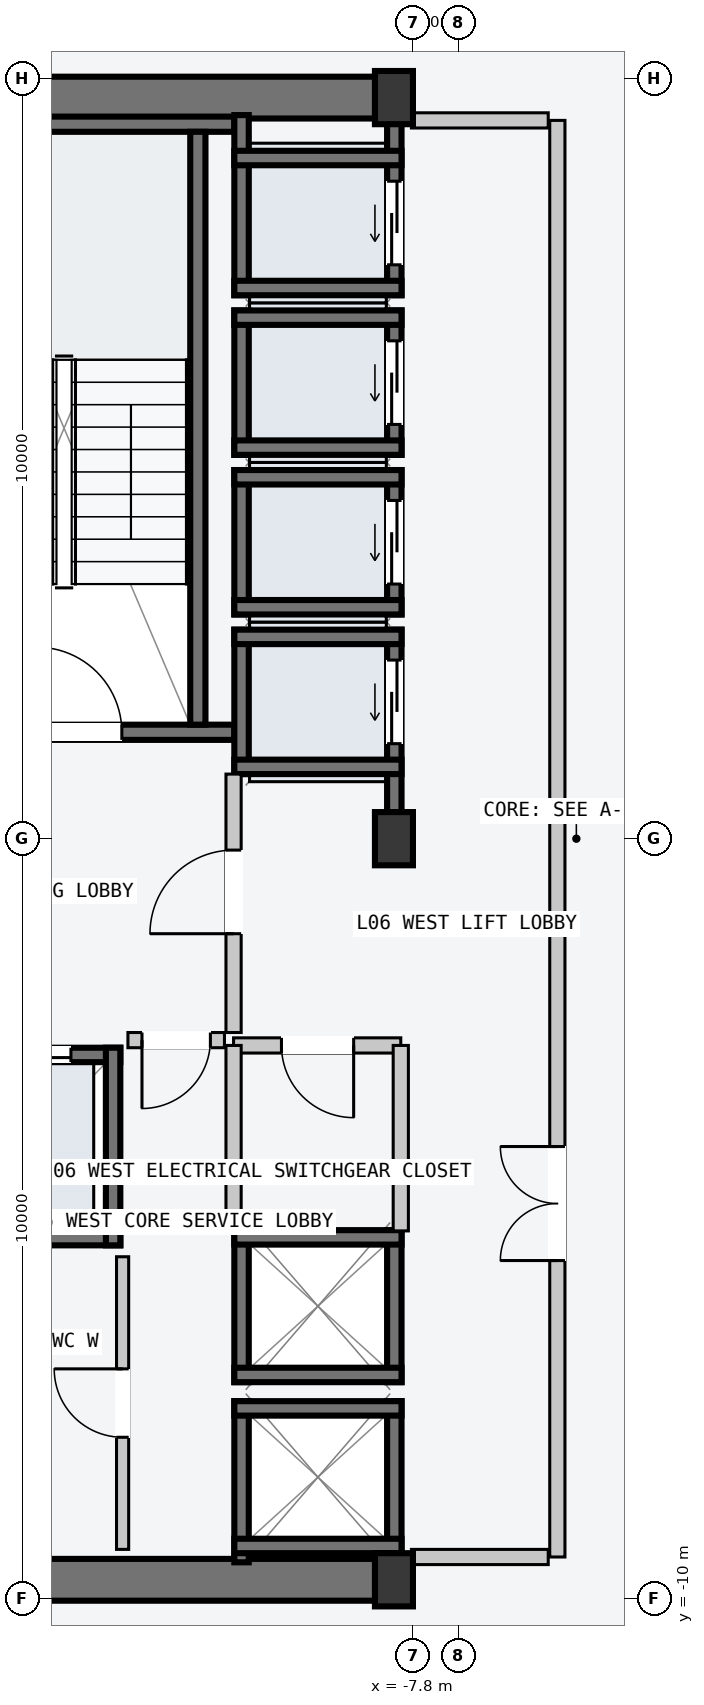
"""IFC4 building model, lengths in metres.
Left out: names, types, materials, properties, quantities, classifications, styles, units other than length and angle.
Written with IfcOpenShell. Run it as: python <this file> out.ifc"""

import sys

from ifc_helpers import new_model, si_unit, direction, frame, frame_2d, origin, origin_2d, place, context, subcontext, project, spatial, rectangle, i_section, extrude, element, fill, save


model = new_model("IFC4")
c1 = context("Model", 3, precision=1e-05, world=origin(), true_north=direction((0.0, 1.0)))
c2 = subcontext(c1, "Body", "Model", "MODEL_VIEW")
j1 = project(units=[si_unit("LENGTHUNIT", "METRE"), si_unit("PLANEANGLEUNIT", "RADIAN")], contexts=[c1])
p1 = place(None, origin())
s1 = spatial("IfcSite", under=j1, at=p1, CompositionType="ELEMENT")
p2 = place(p1, origin())
s2 = spatial("IfcBuilding", under=s1, at=p2, CompositionType="ELEMENT")
p3 = place(p2, frame((0.0, 0.0, 27.6)))
s3 = spatial("IfcBuildingStorey", under=s2, at=p3, CompositionType="ELEMENT", Elevation=27.6)
for number, where, z_axis, x_axis in (
    (1, (-14.53, -9.75, -0.2), (0.0, 0.0, 1.0), (1.0, 0.0, 0.0)),
    (2, (-14.53, 9.75, -0.2), (0.0, 0.0, 1.0), (1.0, 0.0, 0.0)),
):
    element("IfcWall", number, at=place(p3, frame(where, z_axis=z_axis, x_axis=x_axis)), inside=s3, PredefinedType="SHEAR", context=c2, shape_type="SweptSolid", body=[
        extrude(rectangle(XDim=6.46, YDim=0.55, at=frame_2d((3.23, 0.0))), origin(), (0.0, 0.0, 1.0), 3.6),
    ])
p4 = place(p3, frame((-14.25, 1.4, -0.2), z_axis=(0.0, 0.0, 1.0), x_axis=(1.0, 0.0, 0.0)))
e3 = element("IfcWall", 3, at=p4, inside=s3, PredefinedType="SOLIDWALL", context=c2, shape_type="SweptSolid", body=[
    extrude(rectangle(XDim=4.1, YDim=0.2, at=frame_2d((2.05, 0.0))), origin(), (0.0, 0.0, 1.0), 3.6),
])
p5 = place(p4, frame((1.5, 0.0, 0.2)))
e4 = element("IfcOpeningElement", 4, at=p5, cuts=e3, PredefinedType="OPENING", context=c2, shape_type="SweptSolid", body=[
    extrude(rectangle(XDim=1.12, YDim=2.18, at=frame_2d((0.56, 1.09))), frame((0.0, 0.11, 0.0), z_axis=(0.0, -1.0, 0.0), x_axis=(1.0, 0.0, 0.0)), (0.0, 0.0, 1.0), 0.22),
])
p6 = place(p3, frame((-14.25, 9.4, -0.2), z_axis=(0.0, 0.0, 1.0), x_axis=(1.0, 0.0, 0.0)))
e5 = element("IfcWall", 5, at=p6, inside=s3, PredefinedType="SOLIDWALL", context=c2, shape_type="SweptSolid", body=[
    extrude(rectangle(XDim=4.1, YDim=0.2, at=frame_2d((2.05, 0.0))), origin(), (0.0, 0.0, 1.0), 3.6),
])
p7 = place(p3, frame((-10.63, 1.5, -0.2), z_axis=(0.0, 0.0, 1.0), x_axis=(0.0, 1.0, 0.0)))
e6 = element("IfcWall", 6, at=p7, inside=s3, PredefinedType="SOLIDWALL", context=c2, shape_type="SweptSolid", body=[
    extrude(rectangle(XDim=7.8, YDim=0.2, at=frame_2d((3.9, 0.0))), origin(), (0.0, 0.0, 1.0), 3.6),
])
for number, where, z_axis, x_axis in (
    (7, (-8.05, -9.75, 0.0), (0.0, 0.0, 1.0), (1.0, 0.0, 0.0)),
    (8, (-8.05, 0.0, 0.0), (0.0, 0.0, 1.0), (1.0, 0.0, 0.0)),
    (9, (-8.05, 9.75, 0.0), (0.0, 0.0, 1.0), (1.0, 0.0, 0.0)),
):
    element("IfcColumn", number, at=place(p3, frame(where, z_axis=z_axis, x_axis=x_axis)), inside=s3, PredefinedType="COLUMN", context=c2, shape_type="SweptSolid", body=[
        extrude(i_section(OverallWidth=0.5, OverallDepth=0.7, WebThickness=0.028, FlangeThickness=0.045, at=origin_2d()), origin(), (0.0, 0.0, 1.0), 3.6),
    ])
p8 = place(p3, frame((-8.045, 0.21, -0.2), z_axis=(0.0, 0.0, 1.0), x_axis=(0.0, 1.0, 0.0)))
e10 = element("IfcWall", 10, at=p8, inside=s3, PredefinedType="SOLIDWALL", context=c2, shape_type="SweptSolid", body=[
    extrude(rectangle(XDim=2.54, YDim=0.19, at=frame_2d((1.27, 0.0))), origin(), (0.0, 0.0, 1.0), 3.6),
])
p9 = place(p8, frame((1.04, 0.0, 0.2)))
e11 = element("IfcOpeningElement", 11, at=p9, cuts=e10, PredefinedType="OPENING", context=c2, shape_type="SweptSolid", body=[
    extrude(rectangle(XDim=1.1, YDim=2.2, at=frame_2d((0.55, 1.1))), frame((0.0, 0.105, 0.0), z_axis=(0.0, -1.0, 0.0), x_axis=(1.0, 0.0, 0.0)), (0.0, 0.0, 1.0), 0.21),
])
p10 = place(p3, frame((-10.055, 0.85, -0.2), z_axis=(0.0, 0.0, 1.0), x_axis=(0.0, 1.0, 0.0)))
e12 = element("IfcWall", 12, at=p10, inside=s3, PredefinedType="SOLIDWALL", context=c2, shape_type="SweptSolid", body=[
    extrude(rectangle(XDim=1.9, YDim=0.19, at=frame_2d((0.95, 0.0))), origin(), (0.0, 0.0, 1.0), 3.6),
])
for number, where, z_axis, x_axis in (
    (13, (-10.15, 2.655, -0.2), (0.0, 0.0, 1.0), (1.0, 0.0, 0.0)),
    (14, (-10.15, 0.945, -0.2), (0.0, 0.0, 1.0), (1.0, 0.0, 0.0)),
):
    element("IfcWall", number, at=place(p3, frame(where, z_axis=z_axis, x_axis=x_axis)), inside=s3, PredefinedType="SOLIDWALL", context=c2, shape_type="SweptSolid", body=[
        extrude(rectangle(XDim=2.2, YDim=0.19, at=frame_2d((1.1, 0.0))), origin(), (0.0, 0.0, 1.0), 3.6),
    ])
p11 = place(p3, frame((-8.045, 2.95, -0.2), z_axis=(0.0, 0.0, 1.0), x_axis=(0.0, 1.0, 0.0)))
e15 = element("IfcWall", 15, at=p11, inside=s3, PredefinedType="SOLIDWALL", context=c2, shape_type="SweptSolid", body=[
    extrude(rectangle(XDim=1.9, YDim=0.19, at=frame_2d((0.95, 0.0))), origin(), (0.0, 0.0, 1.0), 3.6),
])
p12 = place(p11, frame((0.4, 0.0, 0.2)))
e16 = element("IfcOpeningElement", 16, at=p12, cuts=e15, PredefinedType="OPENING", context=c2, shape_type="SweptSolid", body=[
    extrude(rectangle(XDim=1.1, YDim=2.2, at=frame_2d((0.55, 1.1))), frame((0.0, 0.105, 0.0), z_axis=(0.0, -1.0, 0.0), x_axis=(1.0, 0.0, 0.0)), (0.0, 0.0, 1.0), 0.21),
])
p13 = place(p3, frame((-10.055, 2.95, -0.2), z_axis=(0.0, 0.0, 1.0), x_axis=(0.0, 1.0, 0.0)))
e17 = element("IfcWall", 17, at=p13, inside=s3, PredefinedType="SOLIDWALL", context=c2, shape_type="SweptSolid", body=[
    extrude(rectangle(XDim=1.9, YDim=0.19, at=frame_2d((0.95, 0.0))), origin(), (0.0, 0.0, 1.0), 3.6),
])
for number, where, z_axis, x_axis in (
    (18, (-10.15, 4.755, -0.2), (0.0, 0.0, 1.0), (1.0, 0.0, 0.0)),
    (19, (-10.15, 3.045, -0.2), (0.0, 0.0, 1.0), (1.0, 0.0, 0.0)),
):
    element("IfcWall", number, at=place(p3, frame(where, z_axis=z_axis, x_axis=x_axis)), inside=s3, PredefinedType="SOLIDWALL", context=c2, shape_type="SweptSolid", body=[
        extrude(rectangle(XDim=2.2, YDim=0.19, at=frame_2d((1.1, 0.0))), origin(), (0.0, 0.0, 1.0), 3.6),
    ])
p14 = place(p3, frame((-8.045, 5.05, -0.2), z_axis=(0.0, 0.0, 1.0), x_axis=(0.0, 1.0, 0.0)))
e20 = element("IfcWall", 20, at=p14, inside=s3, PredefinedType="SOLIDWALL", context=c2, shape_type="SweptSolid", body=[
    extrude(rectangle(XDim=1.9, YDim=0.19, at=frame_2d((0.95, 0.0))), origin(), (0.0, 0.0, 1.0), 3.6),
])
p15 = place(p14, frame((0.4, 0.0, 0.2)))
e21 = element("IfcOpeningElement", 21, at=p15, cuts=e20, PredefinedType="OPENING", context=c2, shape_type="SweptSolid", body=[
    extrude(rectangle(XDim=1.1, YDim=2.2, at=frame_2d((0.55, 1.1))), frame((0.0, 0.105, 0.0), z_axis=(0.0, -1.0, 0.0), x_axis=(1.0, 0.0, 0.0)), (0.0, 0.0, 1.0), 0.21),
])
p16 = place(p3, frame((-10.055, 5.05, -0.2), z_axis=(0.0, 0.0, 1.0), x_axis=(0.0, 1.0, 0.0)))
e22 = element("IfcWall", 22, at=p16, inside=s3, PredefinedType="SOLIDWALL", context=c2, shape_type="SweptSolid", body=[
    extrude(rectangle(XDim=1.9, YDim=0.19, at=frame_2d((0.95, 0.0))), origin(), (0.0, 0.0, 1.0), 3.6),
])
for number, where, z_axis, x_axis in (
    (23, (-10.15, 6.855, -0.2), (0.0, 0.0, 1.0), (1.0, 0.0, 0.0)),
    (24, (-10.15, 5.145, -0.2), (0.0, 0.0, 1.0), (1.0, 0.0, 0.0)),
):
    element("IfcWall", number, at=place(p3, frame(where, z_axis=z_axis, x_axis=x_axis)), inside=s3, PredefinedType="SOLIDWALL", context=c2, shape_type="SweptSolid", body=[
        extrude(rectangle(XDim=2.2, YDim=0.19, at=frame_2d((1.1, 0.0))), origin(), (0.0, 0.0, 1.0), 3.6),
    ])
p17 = place(p3, frame((-8.045, 7.15, -0.2), z_axis=(0.0, 0.0, 1.0), x_axis=(0.0, 1.0, 0.0)))
e25 = element("IfcWall", 25, at=p17, inside=s3, PredefinedType="SOLIDWALL", context=c2, shape_type="SweptSolid", body=[
    extrude(rectangle(XDim=2.37, YDim=0.19, at=frame_2d((1.185, 0.0))), origin(), (0.0, 0.0, 1.0), 3.6),
])
p18 = place(p17, frame((0.4, 0.0, 0.2)))
e26 = element("IfcOpeningElement", 26, at=p18, cuts=e25, PredefinedType="OPENING", context=c2, shape_type="SweptSolid", body=[
    extrude(rectangle(XDim=1.1, YDim=2.2, at=frame_2d((0.55, 1.1))), frame((0.0, 0.105, 0.0), z_axis=(0.0, -1.0, 0.0), x_axis=(1.0, 0.0, 0.0)), (0.0, 0.0, 1.0), 0.21),
])
p19 = place(p3, frame((-10.055, 7.15, -0.2), z_axis=(0.0, 0.0, 1.0), x_axis=(0.0, 1.0, 0.0)))
e27 = element("IfcWall", 27, at=p19, inside=s3, PredefinedType="SOLIDWALL", context=c2, shape_type="SweptSolid", body=[
    extrude(rectangle(XDim=2.37, YDim=0.19, at=frame_2d((1.185, 0.0))), origin(), (0.0, 0.0, 1.0), 3.6),
])
for number, where, z_axis, x_axis in (
    (28, (-10.15, 8.955, -0.2), (0.0, 0.0, 1.0), (1.0, 0.0, 0.0)),
    (29, (-10.15, 7.245, -0.2), (0.0, 0.0, 1.0), (1.0, 0.0, 0.0)),
):
    element("IfcWall", number, at=place(p3, frame(where, z_axis=z_axis, x_axis=x_axis)), inside=s3, PredefinedType="SOLIDWALL", context=c2, shape_type="SweptSolid", body=[
        extrude(rectangle(XDim=2.2, YDim=0.19, at=frame_2d((1.1, 0.0))), origin(), (0.0, 0.0, 1.0), 3.6),
    ])
for number, where, z_axis, x_axis in (
    (30, (-8.045, -9.52, -0.2), (0.0, 0.0, 1.0), (0.0, 1.0, 0.0)),
    (31, (-10.055, -9.52, -0.2), (0.0, 0.0, 1.0), (0.0, 1.0, 0.0)),
):
    element("IfcWall", number, at=place(p3, frame(where, z_axis=z_axis, x_axis=x_axis)), inside=s3, PredefinedType="SOLIDWALL", context=c2, shape_type="SweptSolid", body=[
        extrude(rectangle(XDim=2.12, YDim=0.19, at=frame_2d((1.06, 0.0))), origin(), (0.0, 0.0, 1.0), 3.6),
    ])
for number, where, z_axis, x_axis in (
    (32, (-10.15, -7.495, -0.2), (0.0, 0.0, 1.0), (1.0, 0.0, 0.0)),
    (33, (-10.15, -9.305, -0.2), (0.0, 0.0, 1.0), (1.0, 0.0, 0.0)),
):
    element("IfcWall", number, at=place(p3, frame(where, z_axis=z_axis, x_axis=x_axis)), inside=s3, PredefinedType="SOLIDWALL", context=c2, shape_type="SweptSolid", body=[
        extrude(rectangle(XDim=2.2, YDim=0.19, at=frame_2d((1.1, 0.0))), origin(), (0.0, 0.0, 1.0), 3.6),
    ])
for number, where, z_axis, x_axis in (
    (34, (-8.045, -7.15, -0.2), (0.0, 0.0, 1.0), (0.0, 1.0, 0.0)),
    (35, (-10.055, -7.15, -0.2), (0.0, 0.0, 1.0), (0.0, 1.0, 0.0)),
):
    element("IfcWall", number, at=place(p3, frame(where, z_axis=z_axis, x_axis=x_axis)), inside=s3, PredefinedType="SOLIDWALL", context=c2, shape_type="SweptSolid", body=[
        extrude(rectangle(XDim=2.0, YDim=0.19, at=frame_2d((1.0, 0.0))), origin(), (0.0, 0.0, 1.0), 3.6),
    ])
for number, where, z_axis, x_axis in (
    (36, (-10.15, -5.245, -0.2), (0.0, 0.0, 1.0), (1.0, 0.0, 0.0)),
    (37, (-10.15, -7.055, -0.2), (0.0, 0.0, 1.0), (1.0, 0.0, 0.0)),
):
    element("IfcWall", number, at=place(p3, frame(where, z_axis=z_axis, x_axis=x_axis)), inside=s3, PredefinedType="SOLIDWALL", context=c2, shape_type="SweptSolid", body=[
        extrude(rectangle(XDim=2.2, YDim=0.19, at=frame_2d((1.1, 0.0))), origin(), (0.0, 0.0, 1.0), 3.6),
    ])
p20 = place(p3, frame((-14.33, -2.845, -0.2), z_axis=(0.0, 0.0, 1.0), x_axis=(1.0, 0.0, 0.0)))
e38 = element("IfcWall", 38, at=p20, inside=s3, PredefinedType="SOLIDWALL", context=c2, shape_type="SweptSolid", body=[
    extrude(rectangle(XDim=2.68, YDim=0.19, at=frame_2d((1.34, 0.0))), origin(), (0.0, 0.0, 1.0), 3.6),
])
p21 = place(p20, frame((0.83, 0.0, 0.2)))
e39 = element("IfcOpeningElement", 39, at=p21, cuts=e38, PredefinedType="OPENING", context=c2, shape_type="SweptSolid", body=[
    extrude(rectangle(XDim=1.2, YDim=2.2, at=frame_2d((0.6, 1.1))), frame((0.0, 0.105, 0.0), z_axis=(0.0, -1.0, 0.0), x_axis=(1.0, 0.0, 0.0)), (0.0, 0.0, 1.0), 0.21),
])
p22 = place(p3, frame((-14.33, -5.255, -0.2), z_axis=(0.0, 0.0, 1.0), x_axis=(1.0, 0.0, 0.0)))
e40 = element("IfcWall", 40, at=p22, inside=s3, PredefinedType="SOLIDWALL", context=c2, shape_type="SweptSolid", body=[
    extrude(rectangle(XDim=2.68, YDim=0.19, at=frame_2d((1.34, 0.0))), origin(), (0.0, 0.0, 1.0), 3.6),
])
p23 = place(p3, frame((-11.745, -5.35, -0.2), z_axis=(0.0, 0.0, 1.0), x_axis=(0.0, 1.0, 0.0)))
e41 = element("IfcWall", 41, at=p23, inside=s3, PredefinedType="SOLIDWALL", context=c2, shape_type="SweptSolid", body=[
    extrude(rectangle(XDim=2.6, YDim=0.19, at=frame_2d((1.3, 0.0))), origin(), (0.0, 0.0, 1.0), 3.6),
])
p24 = place(p3, frame((-5.9, -9.45, 0.0), z_axis=(0.0, 0.0, 1.0), x_axis=(0.0, 1.0, 0.0)))
e42 = element("IfcWall", 42, at=p24, inside=s3, PredefinedType="PARTITIONING", context=c2, shape_type="SweptSolid", body=[
    extrude(rectangle(XDim=18.9, YDim=0.2, at=frame_2d((9.45, 0.0))), origin(), (0.0, 0.0, 1.0), 3.4),
])
p25 = place(p24, frame((3.9, 0.0, 0.0)))
e43 = element("IfcOpeningElement", 43, at=p25, cuts=e42, PredefinedType="OPENING", context=c2, shape_type="SweptSolid", body=[
    extrude(rectangle(XDim=1.5, YDim=2.2, at=frame_2d((0.75, 1.1))), frame((0.0, 0.11, 0.0), z_axis=(0.0, -1.0, 0.0), x_axis=(1.0, 0.0, 0.0)), (0.0, 0.0, 1.0), 0.22),
])
for number, where, z_axis, x_axis in (
    (44, (-6.02, -9.45, 0.0), (0.0, 0.0, 1.0), (-1.0, 0.0, 0.0)),
    (45, (-6.02, 9.45, 0.0), (0.0, 0.0, 1.0), (-1.0, 0.0, 0.0)),
):
    element("IfcWall", number, at=place(p3, frame(where, z_axis=z_axis, x_axis=x_axis)), inside=s3, PredefinedType="PARTITIONING", context=c2, shape_type="SweptSolid", body=[
        extrude(rectangle(XDim=1.8, YDim=0.2, at=frame_2d((0.9, 0.0))), origin(), (0.0, 0.0, 1.0), 3.4),
    ])
p26 = place(p3, frame((-10.16, -2.55, 0.0), z_axis=(0.0, 0.0, 1.0), x_axis=(0.0, 1.0, 0.0)))
e46 = element("IfcWall", 46, at=p26, inside=s3, PredefinedType="PARTITIONING", context=c2, shape_type="SweptSolid", body=[
    extrude(rectangle(XDim=3.4, YDim=0.2, at=frame_2d((1.7, 0.0))), origin(), (0.0, 0.0, 1.0), 3.4),
])
p27 = place(p26, frame((1.3, 0.0, 0.0)))
e47 = element("IfcOpeningElement", 47, at=p27, cuts=e46, PredefinedType="OPENING", context=c2, shape_type="SweptSolid", body=[
    extrude(rectangle(XDim=1.1, YDim=2.15, at=frame_2d((0.55, 1.075))), frame((0.0, 0.11, 0.0), z_axis=(0.0, -1.0, 0.0), x_axis=(1.0, 0.0, 0.0)), (0.0, 0.0, 1.0), 0.22),
])
p28 = place(p3, frame((-10.28, -2.65, 0.0), z_axis=(0.0, 0.0, 1.0), x_axis=(-1.0, 0.0, 0.0)))
e48 = element("IfcWall", 48, at=p28, inside=s3, PredefinedType="PARTITIONING", context=c2, shape_type="SweptSolid", body=[
    extrude(rectangle(XDim=1.27, YDim=0.2, at=frame_2d((0.635, 0.0))), origin(), (0.0, 0.0, 1.0), 3.4),
])
p29 = place(p28, frame((0.185, 0.0, 0.0)))
e49 = element("IfcOpeningElement", 49, at=p29, cuts=e48, PredefinedType="OPENING", context=c2, shape_type="SweptSolid", body=[
    extrude(rectangle(XDim=0.9, YDim=2.15, at=frame_2d((0.45, 1.075))), frame((0.0, 0.11, 0.0), z_axis=(0.0, -1.0, 0.0), x_axis=(1.0, 0.0, 0.0)), (0.0, 0.0, 1.0), 0.22),
])
p30 = place(p3, frame((-7.96, -2.72, 0.0), z_axis=(0.0, 0.0, 1.0), x_axis=(-1.0, 0.0, 0.0)))
e50 = element("IfcWall", 50, at=p30, inside=s3, PredefinedType="PARTITIONING", context=c2, shape_type="SweptSolid", body=[
    extrude(rectangle(XDim=2.2, YDim=0.2, at=frame_2d((1.1, 0.0))), origin(), (0.0, 0.0, 1.0), 3.4),
])
p31 = place(p30, frame((0.62, 0.0, 0.0)))
e51 = element("IfcOpeningElement", 51, at=p31, cuts=e50, PredefinedType="OPENING", context=c2, shape_type="SweptSolid", body=[
    extrude(rectangle(XDim=0.95, YDim=2.1, at=frame_2d((0.475, 1.05))), frame((0.0, 0.11, 0.0), z_axis=(0.0, -1.0, 0.0), x_axis=(1.0, 0.0, 0.0)), (0.0, 0.0, 1.0), 0.22),
])
for number, where, z_axis, x_axis in (
    (52, (-7.96, -5.16, 0.0), (0.0, 0.0, 1.0), (0.0, 1.0, 0.0)),
    (53, (-10.16, -5.16, 0.0), (0.0, 0.0, 1.0), (0.0, 1.0, 0.0)),
):
    element("IfcWall", number, at=place(p3, frame(where, z_axis=z_axis, x_axis=x_axis)), inside=s3, PredefinedType="PARTITIONING", context=c2, shape_type="SweptSolid", body=[
        extrude(rectangle(XDim=2.44, YDim=0.2, at=frame_2d((1.22, 0.0))), origin(), (0.0, 0.0, 1.0), 3.4),
    ])
p32 = place(p3, frame((-11.62, -9.35, 0.0), z_axis=(0.0, 0.0, 1.0), x_axis=(0.0, 1.0, 0.0)))
e54 = element("IfcWall", 54, at=p32, inside=s3, PredefinedType="PARTITIONING", context=c2, shape_type="SweptSolid", body=[
    extrude(rectangle(XDim=3.85, YDim=0.16, at=frame_2d((1.925, 0.0))), origin(), (0.0, 0.0, 1.0), 3.4),
])
p33 = place(p32, frame((1.475, 0.0, 0.0)))
e55 = element("IfcOpeningElement", 55, at=p33, cuts=e54, PredefinedType="OPENING", context=c2, shape_type="SweptSolid", body=[
    extrude(rectangle(XDim=0.9, YDim=2.15, at=frame_2d((0.45, 1.075))), frame((0.0, 0.09, 0.0), z_axis=(0.0, -1.0, 0.0), x_axis=(1.0, 0.0, 0.0)), (0.0, 0.0, 1.0), 0.18),
])
p34 = place(p5, origin())
e56 = element("IfcDoor", 56, at=p34, inside=s3, OperationType="SINGLE_SWING_LEFT", PredefinedType="DOOR", context=c2, shape_type="SweptSolid", body=[
    extrude(rectangle(XDim=1.12, YDim=2.18, at=frame_2d((0.56, 1.09))), frame((0.0, 0.025, 0.0), z_axis=(0.0, -1.0, 0.0), x_axis=(1.0, 0.0, 0.0)), (0.0, 0.0, 1.0), 0.05),
])
fill(e4, e56)
p35 = place(p9, origin())
e57 = element("IfcDoor", 57, at=p35, inside=s3, OperationType="SLIDING_TO_LEFT", PredefinedType="DOOR", context=c2, shape_type="SweptSolid", body=[
    extrude(rectangle(XDim=1.1, YDim=2.2, at=frame_2d((0.55, 1.1))), frame((0.0, 0.025, 0.0), z_axis=(0.0, -1.0, 0.0), x_axis=(1.0, 0.0, 0.0)), (0.0, 0.0, 1.0), 0.05),
])
fill(e11, e57)
p36 = place(p12, origin())
e58 = element("IfcDoor", 58, at=p36, inside=s3, OperationType="SLIDING_TO_LEFT", PredefinedType="DOOR", context=c2, shape_type="SweptSolid", body=[
    extrude(rectangle(XDim=1.1, YDim=2.2, at=frame_2d((0.55, 1.1))), frame((0.0, 0.025, 0.0), z_axis=(0.0, -1.0, 0.0), x_axis=(1.0, 0.0, 0.0)), (0.0, 0.0, 1.0), 0.05),
])
fill(e16, e58)
p37 = place(p15, origin())
e59 = element("IfcDoor", 59, at=p37, inside=s3, OperationType="SLIDING_TO_LEFT", PredefinedType="DOOR", context=c2, shape_type="SweptSolid", body=[
    extrude(rectangle(XDim=1.1, YDim=2.2, at=frame_2d((0.55, 1.1))), frame((0.0, 0.025, 0.0), z_axis=(0.0, -1.0, 0.0), x_axis=(1.0, 0.0, 0.0)), (0.0, 0.0, 1.0), 0.05),
])
fill(e21, e59)
p38 = place(p18, origin())
e60 = element("IfcDoor", 60, at=p38, inside=s3, OperationType="SLIDING_TO_LEFT", PredefinedType="DOOR", context=c2, shape_type="SweptSolid", body=[
    extrude(rectangle(XDim=1.1, YDim=2.2, at=frame_2d((0.55, 1.1))), frame((0.0, 0.025, 0.0), z_axis=(0.0, -1.0, 0.0), x_axis=(1.0, 0.0, 0.0)), (0.0, 0.0, 1.0), 0.05),
])
fill(e26, e60)
p39 = place(p21, origin())
e61 = element("IfcDoor", 61, at=p39, inside=s3, OperationType="SLIDING_TO_LEFT", PredefinedType="DOOR", context=c2, shape_type="SweptSolid", body=[
    extrude(rectangle(XDim=1.2, YDim=2.2, at=frame_2d((0.6, 1.1))), frame((0.0, 0.025, 0.0), z_axis=(0.0, -1.0, 0.0), x_axis=(1.0, 0.0, 0.0)), (0.0, 0.0, 1.0), 0.05),
])
fill(e39, e61)
p40 = place(p25, origin())
e62 = element("IfcDoor", 62, at=p40, inside=s3, OperationType="DOUBLE_DOOR_SINGLE_SWING", PredefinedType="DOOR", context=c2, shape_type="SweptSolid", body=[
    extrude(rectangle(XDim=1.5, YDim=2.2, at=frame_2d((0.75, 1.1))), frame((0.0, 0.025, 0.0), z_axis=(0.0, -1.0, 0.0), x_axis=(1.0, 0.0, 0.0)), (0.0, 0.0, 1.0), 0.05),
])
fill(e43, e62)
p41 = place(p27, origin())
e63 = element("IfcDoor", 63, at=p41, inside=s3, OperationType="SINGLE_SWING_LEFT", PredefinedType="DOOR", context=c2, shape_type="SweptSolid", body=[
    extrude(rectangle(XDim=1.1, YDim=2.15, at=frame_2d((0.55, 1.075))), frame((0.0, 0.025, 0.0), z_axis=(0.0, -1.0, 0.0), x_axis=(1.0, 0.0, 0.0)), (0.0, 0.0, 1.0), 0.05),
])
fill(e47, e63)
p42 = place(p29, origin())
e64 = element("IfcDoor", 64, at=p42, inside=s3, OperationType="SINGLE_SWING_RIGHT", PredefinedType="DOOR", context=c2, shape_type="SweptSolid", body=[
    extrude(rectangle(XDim=0.9, YDim=2.15, at=frame_2d((0.45, 1.075))), frame((0.0, 0.025, 0.0), z_axis=(0.0, -1.0, 0.0), x_axis=(1.0, 0.0, 0.0)), (0.0, 0.0, 1.0), 0.05),
])
fill(e49, e64)
p43 = place(p31, origin())
e65 = element("IfcDoor", 65, at=p43, inside=s3, OperationType="SINGLE_SWING_LEFT", PredefinedType="DOOR", context=c2, shape_type="SweptSolid", body=[
    extrude(rectangle(XDim=0.95, YDim=2.1, at=frame_2d((0.475, 1.05))), frame((0.0, 0.025, 0.0), z_axis=(0.0, -1.0, 0.0), x_axis=(1.0, 0.0, 0.0)), (0.0, 0.0, 1.0), 0.05),
])
fill(e51, e65)
p44 = place(p33, origin())
e66 = element("IfcDoor", 66, at=p44, inside=s3, OperationType="SINGLE_SWING_RIGHT", PredefinedType="DOOR", context=c2, shape_type="SweptSolid", body=[
    extrude(rectangle(XDim=0.9, YDim=2.15, at=frame_2d((0.45, 1.075))), frame((0.0, 0.025, 0.0), z_axis=(0.0, -1.0, 0.0), x_axis=(1.0, 0.0, 0.0)), (0.0, 0.0, 1.0), 0.05),
])
fill(e55, e66)
save(model, sys.argv[1])
